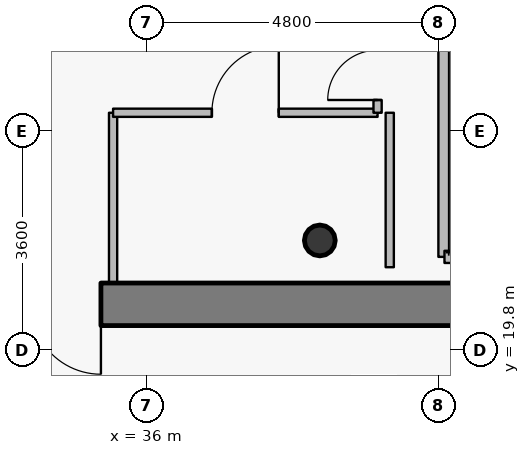
"""IFC4 building model, lengths in metres.
Left out: names, types, materials, properties, quantities, classifications, styles, units other than length and angle.
Written with IfcOpenShell. Run it as: python <this file> out.ifc"""

import sys

from ifc_helpers import new_model, si_unit, direction, frame, frame_2d, origin, origin_2d, place, context, subcontext, project, spatial, rectangle, hollow_circle, extrude, source, transform, mapped, element, fill, save


model = new_model("IFC4")
c1 = context("Model", 3, precision=1e-05, world=origin(), true_north=direction((0.0, 1.0)))
c2 = subcontext(c1, "Body", "Model", "MODEL_VIEW")
j1 = project(units=[si_unit("LENGTHUNIT", "METRE"), si_unit("PLANEANGLEUNIT", "RADIAN")], contexts=[c1])
p1 = place(None, origin())
s1 = spatial("IfcSite", under=j1, at=p1, CompositionType="ELEMENT")
p2 = place(p1, origin())
s2 = spatial("IfcBuilding", under=s1, at=p2, CompositionType="ELEMENT")
p3 = place(p2, frame((0.0, 0.0, 284.25)))
s3 = spatial("IfcBuildingStorey", under=s2, at=p3, CompositionType="ELEMENT", Elevation=284.25)
p4 = place(p3, frame((38.85, 21.6, 0.0), z_axis=(0.0, 0.0, 1.0), x_axis=(1.0, 0.0, 0.0)))
e1 = element("IfcColumn", 1, at=p4, inside=s3, PredefinedType="COLUMN", context=c2, shape_type="SweptSolid", body=[
    extrude(hollow_circle(Radius=0.254, WallThickness=0.02, at=origin_2d()), origin(), (0.0, 0.0, 1.0), 3.75),
])
p5 = place(p3, frame((44.35, 20.55, 0.0), z_axis=(0.0, 0.0, 1.0), x_axis=(-1.0, 0.0, 0.0)))
e2 = element("IfcWall", 2, at=p5, inside=s3, PredefinedType="SHEAR", context=c2, shape_type="SweptSolid", body=[
    extrude(rectangle(XDim=16.7, YDim=0.7, at=frame_2d((8.35, 0.0))), origin(), (0.0, 0.0, 1.0), 3.05),
])
p6 = place(p5, frame((12.925, 0.0, 0.0)))
e3 = element("IfcOpeningElement", 3, at=p6, cuts=e2, PredefinedType="OPENING", context=c2, shape_type="SweptSolid", body=[
    extrude(rectangle(XDim=1.15, YDim=2.15, at=origin_2d()), frame((0.575, 0.36, 1.075), z_axis=(0.0, -1.0, 0.0), x_axis=(1.0, 0.0, 0.0)), (0.0, 0.0, 1.0), 0.72),
])
p7 = place(p5, frame((9.1, 0.0, 0.0)))
e4 = element("IfcOpeningElement", 4, at=p7, cuts=e2, PredefinedType="OPENING", context=c2, shape_type="SweptSolid", body=[
    extrude(rectangle(XDim=1.15, YDim=2.15, at=origin_2d()), frame((0.575, 0.36, 1.075), z_axis=(0.0, -1.0, 0.0), x_axis=(1.0, 0.0, 0.0)), (0.0, 0.0, 1.0), 0.72),
])
p8 = place(p3, frame((35.45, 20.9, 0.0), z_axis=(0.0, 0.0, 1.0), x_axis=(0.0, 1.0, 0.0)))
e5 = element("IfcWall", 5, at=p8, inside=s3, PredefinedType="PARTITIONING", context=c2, shape_type="SweptSolid", body=[
    extrude(rectangle(XDim=2.8, YDim=0.135, at=frame_2d((1.4, 0.0))), origin(), (0.0, 0.0, 1.0), 3.085),
])
p9 = place(p3, frame((35.45, 23.7, 0.0), z_axis=(0.0, 0.0, 1.0), x_axis=(1.0, 0.0, 0.0)))
e6 = element("IfcWall", 6, at=p9, inside=s3, PredefinedType="PARTITIONING", context=c2, shape_type="SweptSolid", body=[
    extrude(rectangle(XDim=4.35, YDim=0.135, at=frame_2d((2.175, 0.0))), origin(), (0.0, 0.0, 1.0), 3.085),
])
p10 = place(p9, frame((1.625, 0.0, 0.0)))
e7 = element("IfcOpeningElement", 7, at=p10, cuts=e6, PredefinedType="OPENING", context=c2, shape_type="SweptSolid", body=[
    extrude(rectangle(XDim=1.1, YDim=2.15, at=origin_2d()), frame((0.55, 0.078, 1.075), z_axis=(0.0, -1.0, 0.0), x_axis=(1.0, 0.0, 0.0)), (0.0, 0.0, 1.0), 0.155),
])
p11 = place(p3, frame((39.8, 23.7, 0.0), z_axis=(0.0, 0.0, 1.0), x_axis=(0.0, 1.0, 0.0)))
e8 = element("IfcWall", 8, at=p11, inside=s3, PredefinedType="PARTITIONING", context=c2, shape_type="SweptSolid", body=[
    extrude(rectangle(XDim=1.75, YDim=0.135, at=frame_2d((0.875, 0.0))), origin(), (0.0, 0.0, 1.0), 3.5),
])
p12 = place(p11, frame((0.21, 0.0, 0.0)))
e9 = element("IfcOpeningElement", 9, at=p12, cuts=e8, PredefinedType="OPENING", context=c2, shape_type="SweptSolid", body=[
    extrude(rectangle(XDim=0.82, YDim=2.1, at=origin_2d()), frame((0.41, 0.078, 1.05), z_axis=(0.0, -1.0, 0.0), x_axis=(1.0, 0.0, 0.0)), (0.0, 0.0, 1.0), 0.155),
])
p13 = place(p3, frame((40.9, 21.33, 0.0), z_axis=(0.0, 0.0, 1.0), x_axis=(0.0, 1.0, 0.0)))
e10 = element("IfcWall", 10, at=p13, inside=s3, PredefinedType="PARTITIONING", context=c2, shape_type="SweptSolid", body=[
    extrude(rectangle(XDim=5.91, YDim=0.2, at=frame_2d((2.955, 0.0))), origin(), (0.0, 0.0, 1.0), 3.035),
])
p14 = place(p3, frame((40.9, 21.33, 0.0), z_axis=(0.0, 0.0, 1.0), x_axis=(1.0, 0.0, 0.0)))
e11 = element("IfcWall", 11, at=p14, inside=s3, PredefinedType="PARTITIONING", context=c2, shape_type="SweptSolid", body=[
    extrude(rectangle(XDim=0.25, YDim=0.2, at=frame_2d((0.125, 0.0))), origin(), (0.0, 0.0, 1.0), 3.035),
])
p15 = place(p3, frame((40.0, 23.7, 0.0), z_axis=(0.0, 0.0, 1.0), x_axis=(0.0, -1.0, 0.0)))
e12 = element("IfcWall", 12, at=p15, inside=s3, PredefinedType="PARTITIONING", context=c2, shape_type="SweptSolid", body=[
    extrude(rectangle(XDim=2.54, YDim=0.135, at=frame_2d((1.27, 0.0))), origin(), (0.0, 0.0, 1.0), 3.035),
])
m1 = source(origin(), c2, "Body", "SweptSolid", [
    extrude(rectangle(XDim=1.15, YDim=2.15, at=origin_2d()), frame((0.575, 0.025, 1.075), z_axis=(0.0, -1.0, 0.0), x_axis=(1.0, 0.0, 0.0)), (0.0, 0.0, 1.0), 0.05),
])
p16 = place(p7, origin())
e13 = element("IfcDoor", 13, at=p16, inside=s3, OperationType="SINGLE_SWING_LEFT", PredefinedType="DOOR", context=c2, shape_type="MappedRepresentation", body=[
    mapped(m1, transform((0.0, 0.0, 0.0), x_axis=(1.0, 0.0, 0.0), y_axis=(0.0, 1.0, 0.0), z_axis=(0.0, 0.0, 1.0), scale=1.0)),
])
fill(e4, e13)
m2 = source(origin(), c2, "Body", "SweptSolid", [
    extrude(rectangle(XDim=1.1, YDim=2.15, at=origin_2d()), frame((0.55, 0.025, 1.075), z_axis=(0.0, -1.0, 0.0), x_axis=(1.0, 0.0, 0.0)), (0.0, 0.0, 1.0), 0.05),
])
p17 = place(p10, origin())
e14 = element("IfcDoor", 14, at=p17, inside=s3, OperationType="SINGLE_SWING_RIGHT", PredefinedType="DOOR", context=c2, shape_type="MappedRepresentation", body=[
    mapped(m2, transform((0.0, 0.0, 0.0), x_axis=(1.0, 0.0, 0.0), y_axis=(0.0, 1.0, 0.0), z_axis=(0.0, 0.0, 1.0), scale=1.0)),
])
fill(e7, e14)
m3 = source(origin(), c2, "Body", "SweptSolid", [
    extrude(rectangle(XDim=0.82, YDim=2.1, at=origin_2d()), frame((0.41, 0.025, 1.05), z_axis=(0.0, -1.0, 0.0), x_axis=(1.0, 0.0, 0.0)), (0.0, 0.0, 1.0), 0.05),
])
p18 = place(p12, origin())
e15 = element("IfcDoor", 15, at=p18, inside=s3, OperationType="SINGLE_SWING_LEFT", PredefinedType="DOOR", context=c2, shape_type="MappedRepresentation", body=[
    mapped(m3, transform((0.0, 0.0, 0.0), x_axis=(1.0, 0.0, 0.0), y_axis=(0.0, 1.0, 0.0), z_axis=(0.0, 0.0, 1.0), scale=1.0)),
])
fill(e9, e15)
save(model, sys.argv[1])
